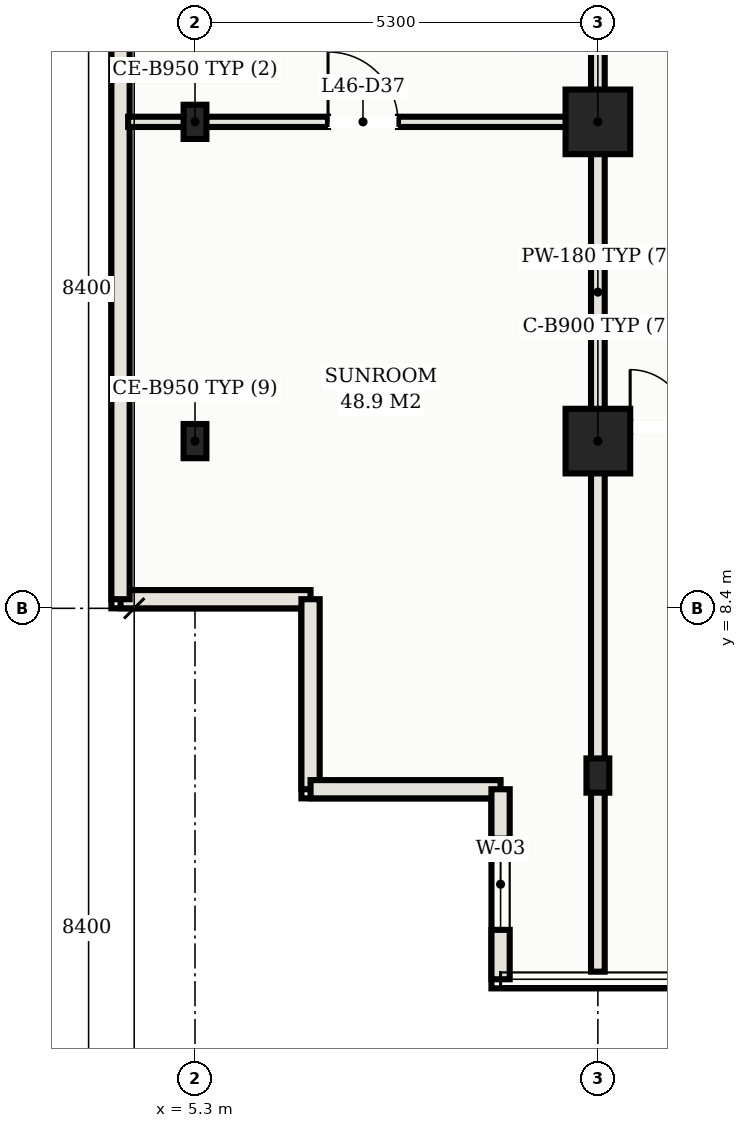
"""IFC4 building model, lengths in metres.
Left out: names, types, materials, properties, quantities, classifications, styles, units other than length and angle.
Written with IfcOpenShell. Run it as: python <this file> out.ifc"""

import sys

from ifc_helpers import new_model, si_unit, direction, frame, frame_2d, origin, origin_2d, place, context, subcontext, project, spatial, rectangle, hollow_rectangle, extrude, element, fill, save


model = new_model("IFC4")
c1 = context("Model", 3, precision=1e-05, world=origin(), true_north=direction((0.0, 1.0)))
c2 = subcontext(c1, "Body", "Model", "MODEL_VIEW")
j1 = project(units=[si_unit("LENGTHUNIT", "METRE"), si_unit("PLANEANGLEUNIT", "RADIAN")], contexts=[c1])
p1 = place(None, origin())
s1 = spatial("IfcSite", under=j1, at=p1, CompositionType="ELEMENT")
p2 = place(p1, origin())
s2 = spatial("IfcBuilding", under=s1, at=p2, CompositionType="ELEMENT")
p3 = place(p2, frame((0.0, 0.0, 168.9)))
s3 = spatial("IfcBuildingStorey", under=s2, at=p3, CompositionType="ELEMENT", Elevation=168.9)
for number, where, z_axis, x_axis in (
    (1, (10.6, 14.8, 0.0), (0.0, 0.0, 1.0), (1.0, 0.0, 0.0)),
    (2, (10.6, 10.6, 0.0), (0.0, 0.0, 1.0), (1.0, 0.0, 0.0)),
):
    element("IfcColumn", number, at=place(p3, frame(where, z_axis=z_axis, x_axis=x_axis)), inside=s3, PredefinedType="COLUMN", context=c2, shape_type="SweptSolid", body=[
        extrude(hollow_rectangle(XDim=0.85, YDim=0.85, WallThickness=0.028, at=origin_2d()), origin(), (0.0, 0.0, 1.0), 3.3),
    ])
for number, where, z_axis, x_axis in (
    (3, (10.6, 6.2, 0.0), (0.0, 0.0, 1.0), (1.0, 0.0, 0.0)),
    (4, (5.3, 10.6, 0.0), (0.0, 0.0, 1.0), (1.0, 0.0, 0.0)),
    (5, (5.3, 14.8, 0.0), (0.0, 0.0, 1.0), (1.0, 0.0, 0.0)),
):
    element("IfcColumn", number, at=place(p3, frame(where, z_axis=z_axis, x_axis=x_axis)), inside=s3, PredefinedType="COLUMN", context=c2, shape_type="SweptSolid", body=[
        extrude(hollow_rectangle(XDim=0.3, YDim=0.45, WallThickness=0.016, at=origin_2d()), origin(), (0.0, 0.0, 1.0), 3.3),
    ])
for number, where, z_axis, x_axis in (
    (6, (4.32, 8.52, 0.0), (0.0, 0.0, 1.0), (1.0, 0.0, 0.0)),
    (7, (6.82, 8.52, 0.0), (0.0, 0.0, 1.0), (0.0, -1.0, 0.0)),
    (8, (6.82, 6.02, 0.0), (0.0, 0.0, 1.0), (1.0, 0.0, 0.0)),
):
    element("IfcWall", number, at=place(p3, frame(where, z_axis=z_axis, x_axis=x_axis)), inside=s3, PredefinedType="SOLIDWALL", context=c2, shape_type="SweptSolid", body=[
        extrude(rectangle(XDim=2.5, YDim=0.24, at=frame_2d((1.25, 0.0))), origin(), (0.0, 0.0, 1.0), 3.1),
    ])
p4 = place(p3, frame((9.32, 6.02, 0.0), z_axis=(0.0, 0.0, 1.0), x_axis=(0.0, -1.0, 0.0)))
e9 = element("IfcWall", 9, at=p4, inside=s3, PredefinedType="SOLIDWALL", context=c2, shape_type="SweptSolid", body=[
    extrude(rectangle(XDim=2.5, YDim=0.24, at=frame_2d((1.25, 0.0))), origin(), (0.0, 0.0, 1.0), 3.1),
])
p5 = place(p4, frame((0.65, 0.0, 0.75)))
e10 = element("IfcOpeningElement", 10, at=p5, cuts=e9, PredefinedType="OPENING", context=c2, shape_type="SweptSolid", body=[
    extrude(rectangle(XDim=1.2, YDim=1.5, at=frame_2d((0.6, 0.75))), frame((0.0, 0.13, 0.0), z_axis=(0.0, -1.0, 0.0), x_axis=(1.0, 0.0, 0.0)), (0.0, 0.0, 1.0), 0.26),
])
p6 = place(p3, frame((4.32, 35.93, 0.0), z_axis=(0.0, 0.0, 1.0), x_axis=(0.0, -1.0, 0.0)))
e11 = element("IfcWall", 11, at=p6, inside=s3, PredefinedType="SOLIDWALL", context=c2, shape_type="SweptSolid", body=[
    extrude(rectangle(XDim=27.41, YDim=0.24, at=frame_2d((13.705, 0.0))), origin(), (0.0, 0.0, 1.0), 3.1),
])
p7 = place(p3, frame((10.6, 3.62, 0.0), z_axis=(0.0, 0.0, 1.0), x_axis=(0.0, 1.0, 0.0)))
e12 = element("IfcWall", 12, at=p7, inside=s3, PredefinedType="PARTITIONING", context=c2, shape_type="SweptSolid", body=[
    extrude(rectangle(XDim=17.88, YDim=0.18, at=frame_2d((8.94, 0.0))), origin(), (0.0, 0.0, 1.0), 2.38),
])
p8 = place(p3, frame((10.6, 10.79, 0.0), z_axis=(0.0, 0.0, 1.0), x_axis=(1.0, 0.0, 0.0)))
e13 = element("IfcWall", 13, at=p8, inside=s3, PredefinedType="PARTITIONING", context=c2, shape_type="SweptSolid", body=[
    extrude(rectangle(XDim=10.6, YDim=0.135, at=frame_2d((5.3, 0.0))), origin(), (0.0, 0.0, 1.0), 2.38),
])
p9 = place(p8, frame((0.425, 0.0, 0.0)))
e14 = element("IfcOpeningElement", 14, at=p9, cuts=e13, PredefinedType="OPENING", context=c2, shape_type="SweptSolid", body=[
    extrude(rectangle(XDim=1.5, YDim=2.25, at=frame_2d((0.75, 1.125))), frame((0.0, 0.078, 0.0), z_axis=(0.0, -1.0, 0.0), x_axis=(1.0, 0.0, 0.0)), (0.0, 0.0, 1.0), 0.155),
])
p10 = place(p3, frame((4.42, 14.8, 0.0), z_axis=(0.0, 0.0, 1.0), x_axis=(1.0, 0.0, 0.0)))
e15 = element("IfcWall", 15, at=p10, inside=s3, PredefinedType="PARTITIONING", context=c2, shape_type="SweptSolid", body=[
    extrude(rectangle(XDim=6.18, YDim=0.135, at=frame_2d((3.09, 0.0))), origin(), (0.0, 0.0, 1.0), 2.38),
])
p11 = place(p10, frame((2.63, 0.0, 0.0)))
e16 = element("IfcOpeningElement", 16, at=p11, cuts=e15, PredefinedType="OPENING", context=c2, shape_type="SweptSolid", body=[
    extrude(rectangle(XDim=0.92, YDim=2.15, at=frame_2d((0.46, 1.075))), frame((0.0, 0.078, 0.0), z_axis=(0.0, -1.0, 0.0), x_axis=(1.0, 0.0, 0.0)), (0.0, 0.0, 1.0), 0.155),
])
p12 = place(p5, origin())
e17 = element("IfcWindow", 17, at=p12, inside=s3, PartitioningType="SINGLE_PANEL", PredefinedType="WINDOW", context=c2, shape_type="SweptSolid", body=[
    extrude(rectangle(XDim=1.2, YDim=1.5, at=frame_2d((0.6, 0.75))), frame((0.0, 0.03, 0.0), z_axis=(0.0, -1.0, 0.0), x_axis=(1.0, 0.0, 0.0)), (0.0, 0.0, 1.0), 0.06),
])
fill(e10, e17)
p13 = place(p9, origin())
e18 = element("IfcDoor", 18, at=p13, inside=s3, OperationType="DOUBLE_DOOR_SINGLE_SWING", PredefinedType="DOOR", context=c2, shape_type="SweptSolid", body=[
    extrude(rectangle(XDim=1.5, YDim=2.25, at=frame_2d((0.75, 1.125))), frame((0.0, 0.025, 0.0), z_axis=(0.0, -1.0, 0.0), x_axis=(1.0, 0.0, 0.0)), (0.0, 0.0, 1.0), 0.05),
])
fill(e14, e18)
p14 = place(p11, origin())
e19 = element("IfcDoor", 19, at=p14, inside=s3, OperationType="SINGLE_SWING_LEFT", PredefinedType="DOOR", context=c2, shape_type="SweptSolid", body=[
    extrude(rectangle(XDim=0.92, YDim=2.15, at=frame_2d((0.46, 1.075))), frame((0.0, 0.025, 0.0), z_axis=(0.0, -1.0, 0.0), x_axis=(1.0, 0.0, 0.0)), (0.0, 0.0, 1.0), 0.05),
])
fill(e16, e19)
save(model, sys.argv[1])
